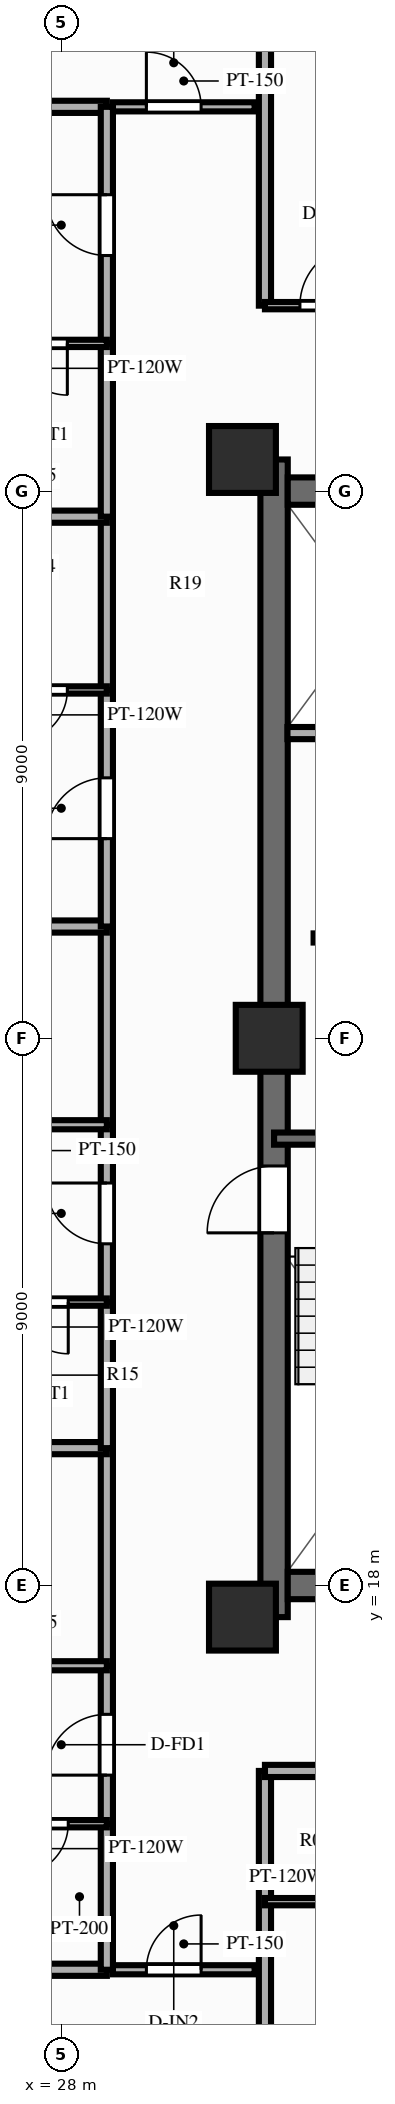
"""IFC4 building model, lengths in metres.
Left out: names, types, materials, properties, quantities, classifications, styles, units other than length and angle.
Written with IfcOpenShell. Run it as: python <this file> out.ifc"""

import sys

from ifc_helpers import new_model, si_unit, direction, frame, frame_2d, origin, origin_2d, place, context, subcontext, project, spatial, rectangle, extrude, source, transform, mapped, element, fill, save


model = new_model("IFC4")
c1 = context("Model", 3, precision=1e-05, world=origin(), true_north=direction((0.0, 1.0)))
c2 = subcontext(c1, "Body", "Model", "MODEL_VIEW")
j1 = project(units=[si_unit("LENGTHUNIT", "METRE"), si_unit("PLANEANGLEUNIT", "RADIAN")], contexts=[c1])
p1 = place(None, origin())
s1 = spatial("IfcSite", under=j1, at=p1, CompositionType="ELEMENT")
p2 = place(p1, origin())
s2 = spatial("IfcBuilding", under=s1, at=p2, CompositionType="ELEMENT")
p3 = place(p2, frame((0.0, 0.0, 199.6)))
s3 = spatial("IfcBuildingStorey", under=s2, at=p3, CompositionType="ELEMENT", Elevation=199.6)
p4 = place(p3, frame((31.5, 17.48, 0.0), z_axis=(0.0, 0.0, 1.0), x_axis=(0.0, 1.0, 0.0)))
e1 = element("IfcWall", 1, at=p4, inside=s3, PredefinedType="SHEAR", context=c2, shape_type="SweptSolid", body=[
    extrude(rectangle(XDim=19.04, YDim=0.45, at=frame_2d((9.52, 0.0))), origin(), (0.0, 0.0, 1.0), 3.0),
])
p5 = place(p4, frame((6.32, 0.0, 0.0)))
e2 = element("IfcOpeningElement", 2, at=p5, cuts=e1, PredefinedType="OPENING", context=c2, shape_type="SweptSolid", body=[
    extrude(rectangle(XDim=1.1, YDim=2.15, at=frame_2d((0.55, 1.075))), frame((0.0, 0.237, 0.0), z_axis=(0.0, -1.0, 0.0), x_axis=(1.0, 0.0, 0.0)), (0.0, 0.0, 1.0), 0.474),
])
p6 = place(p3, frame((31.725, 18.0, 0.0), z_axis=(0.0, 0.0, 1.0), x_axis=(1.0, 0.0, 0.0)))
e3 = element("IfcWall", 3, at=p6, inside=s3, PredefinedType="SHEAR", context=c2, shape_type="SweptSolid", body=[
    extrude(rectangle(XDim=12.55, YDim=0.45, at=frame_2d((6.275, 0.0))), origin(), (0.0, 0.0, 1.0), 3.0),
])
p7 = place(p3, frame((31.725, 36.0, 0.0), z_axis=(0.0, 0.0, 1.0), x_axis=(1.0, 0.0, 0.0)))
e4 = element("IfcWall", 4, at=p7, inside=s3, PredefinedType="SHEAR", context=c2, shape_type="SweptSolid", body=[
    extrude(rectangle(XDim=12.55, YDim=0.45, at=frame_2d((6.275, 0.0))), origin(), (0.0, 0.0, 1.0), 3.0),
])
p8 = place(p7, frame((5.225, 0.0, 0.0), z_axis=(0.0, 0.0, 1.0), x_axis=(-1.0, 0.0, 0.0)))
e5 = element("IfcOpeningElement", 5, at=p8, cuts=e4, PredefinedType="OPENING", context=c2, shape_type="SweptSolid", body=[
    extrude(rectangle(XDim=1.4, YDim=2.15, at=frame_2d((0.7, 1.075))), frame((0.0, 0.237, 0.0), z_axis=(0.0, -1.0, 0.0), x_axis=(1.0, 0.0, 0.0)), (0.0, 0.0, 1.0), 0.474),
])
m1 = source(origin(), c2, "Body", "SweptSolid", [
    extrude(rectangle(XDim=1.1, YDim=1.1, at=origin_2d()), origin(), (0.0, 0.0, 1.0), 3.0),
])
for number, where, z_axis, x_axis in (
    (6, (30.98, 17.48, 0.0), (0.0, 0.0, 1.0), (1.0, 0.0, 0.0)),
    (7, (30.98, 36.52, 0.0), (0.0, 0.0, 1.0), (1.0, 0.0, 0.0)),
    (8, (31.42, 27.0, 0.0), (0.0, 0.0, 1.0), (1.0, 0.0, 0.0)),
):
    element("IfcColumn", number, at=place(p3, frame(where, z_axis=z_axis, x_axis=x_axis)), inside=s3, PredefinedType="COLUMN", context=c2, shape_type="MappedRepresentation", body=[
        mapped(m1, transform((0.0, 0.0, 0.0), scale=1.0)),
    ])
p9 = place(p3, frame((32.15, 28.65, 0.0), z_axis=(0.0, 0.0, 1.0), x_axis=(1.0, 0.0, 0.0)))
e9 = element("IfcWall", 9, at=p9, inside=s3, PredefinedType="PARTITIONING", context=c2, shape_type="SweptSolid", body=[
    extrude(rectangle(XDim=2.27, YDim=0.15, at=frame_2d((1.135, 0.0))), origin(), (0.0, 0.0, 1.0), 2.14),
])
p10 = place(p3, frame((31.5, 25.35, 0.0), z_axis=(0.0, 0.0, 1.0), x_axis=(1.0, 0.0, 0.0)))
e10 = element("IfcWall", 10, at=p10, inside=s3, PredefinedType="SOLIDWALL", context=c2, shape_type="SweptSolid", body=[
    extrude(rectangle(XDim=3.93, YDim=0.2, at=frame_2d((1.965, 0.0))), origin(), (0.0, 0.0, 1.0), 2.79),
])
p11 = place(p3, frame((31.72, 32.02, 0.0), z_axis=(0.0, 0.0, 1.0), x_axis=(1.0, 0.0, 0.0)))
e11 = element("IfcWall", 11, at=p11, inside=s3, PredefinedType="PARTITIONING", context=c2, shape_type="SweptSolid", body=[
    extrude(rectangle(XDim=2.8, YDim=0.2, at=frame_2d((1.4, 0.0))), origin(), (0.0, 0.0, 1.0), 2.79),
])
p12 = place(p3, frame((28.85, 11.68, 0.0), z_axis=(0.0, 0.0, 1.0), x_axis=(1.0, 0.0, 0.0)))
e12 = element("IfcWall", 12, at=p12, inside=s3, PredefinedType="PARTITIONING", context=c2, shape_type="SweptSolid", body=[
    extrude(rectangle(XDim=2.33, YDim=0.15, at=frame_2d((1.165, 0.0))), origin(), (0.0, 0.0, 1.0), 2.79),
])
p13 = place(p12, frame((0.55, 0.0, 0.0)))
e13 = element("IfcOpeningElement", 13, at=p13, cuts=e12, PredefinedType="OPENING", context=c2, shape_type="SweptSolid", body=[
    extrude(rectangle(XDim=0.9, YDim=2.1, at=frame_2d((0.45, 1.05))), frame((0.0, 0.087, 0.0), z_axis=(0.0, -1.0, 0.0), x_axis=(1.0, 0.0, 0.0)), (0.0, 0.0, 1.0), 0.174),
])
p14 = place(p3, frame((28.85, 42.32, 0.0), z_axis=(0.0, 0.0, 1.0), x_axis=(1.0, 0.0, 0.0)))
e14 = element("IfcWall", 14, at=p14, inside=s3, PredefinedType="PARTITIONING", context=c2, shape_type="SweptSolid", body=[
    extrude(rectangle(XDim=2.33, YDim=0.15, at=frame_2d((1.165, 0.0))), origin(), (0.0, 0.0, 1.0), 2.79),
])
p15 = place(p14, frame((0.55, 0.0, 0.0)))
e15 = element("IfcOpeningElement", 15, at=p15, cuts=e14, PredefinedType="OPENING", context=c2, shape_type="SweptSolid", body=[
    extrude(rectangle(XDim=0.9, YDim=2.1, at=frame_2d((0.45, 1.05))), frame((0.0, 0.087, 0.0), z_axis=(0.0, -1.0, 0.0), x_axis=(1.0, 0.0, 0.0)), (0.0, 0.0, 1.0), 0.174),
])
p16 = place(p3, frame((31.35, 14.95, 0.0), z_axis=(0.0, 0.0, 1.0), x_axis=(0.0, -1.0, 0.0)))
e16 = element("IfcWall", 16, at=p16, inside=s3, PredefinedType="PARTITIONING", context=c2, shape_type="SweptSolid", body=[
    extrude(rectangle(XDim=8.8, YDim=0.2, at=frame_2d((4.4, 0.0))), origin(), (0.0, 0.0, 1.0), 2.39),
])
p17 = place(p3, frame((31.35, 14.95, 0.0), z_axis=(0.0, 0.0, 1.0), x_axis=(1.0, 0.0, 0.0)))
e17 = element("IfcWall", 17, at=p17, inside=s3, PredefinedType="PARTITIONING", context=c2, shape_type="SweptSolid", body=[
    extrude(rectangle(XDim=2.85, YDim=0.2, at=frame_2d((1.425, 0.0))), origin(), (0.0, 0.0, 1.0), 2.79),
])
p18 = place(p3, frame((31.35, 12.8, 0.0), z_axis=(0.0, 0.0, 1.0), x_axis=(1.0, 0.0, 0.0)))
e18 = element("IfcWall", 18, at=p18, inside=s3, PredefinedType="PARTITIONING", context=c2, shape_type="SweptSolid", body=[
    extrude(rectangle(XDim=2.85, YDim=0.12, at=frame_2d((1.425, 0.0))), origin(), (0.0, 0.0, 1.0), 2.79),
])
p19 = place(p3, frame((31.35, 39.05, 0.0), z_axis=(0.0, 0.0, 1.0), x_axis=(0.0, 1.0, 0.0)))
e19 = element("IfcWall", 19, at=p19, inside=s3, PredefinedType="PARTITIONING", context=c2, shape_type="SweptSolid", body=[
    extrude(rectangle(XDim=8.8, YDim=0.2, at=frame_2d((4.4, 0.0))), origin(), (0.0, 0.0, 1.0), 2.39),
])
p20 = place(p3, frame((31.35, 39.05, 0.0), z_axis=(0.0, 0.0, 1.0), x_axis=(1.0, 0.0, 0.0)))
e20 = element("IfcWall", 20, at=p20, inside=s3, PredefinedType="PARTITIONING", context=c2, shape_type="SweptSolid", body=[
    extrude(rectangle(XDim=2.15, YDim=0.12, at=frame_2d((1.075, 0.0))), origin(), (0.0, 0.0, 1.0), 2.79),
])
p21 = place(p20, frame((0.575, 0.0, 0.0)))
e21 = element("IfcOpeningElement", 21, at=p21, cuts=e20, PredefinedType="OPENING", context=c2, shape_type="SweptSolid", body=[
    extrude(rectangle(XDim=1.0, YDim=2.1, at=frame_2d((0.5, 1.05))), frame((0.0, 0.072, 0.0), z_axis=(0.0, -1.0, 0.0), x_axis=(1.0, 0.0, 0.0)), (0.0, 0.0, 1.0), 0.144),
])
for number, where, z_axis, x_axis in (
    (22, (28.75, 11.68, 0.0), (0.0, 0.0, 1.0), (-1.0, 0.0, 0.0)),
    (23, (28.75, 42.32, 0.0), (0.0, 0.0, 1.0), (-1.0, 0.0, 0.0)),
):
    element("IfcWall", number, at=place(p3, frame(where, z_axis=z_axis, x_axis=x_axis)), inside=s3, PredefinedType="PARTITIONING", context=c2, shape_type="SweptSolid", body=[
        extrude(rectangle(XDim=9.1, YDim=0.2, at=frame_2d((4.55, 0.0))), origin(), (0.0, 0.0, 1.0), 2.79),
    ])
p22 = place(p3, frame((28.75, 11.68, 0.0), z_axis=(0.0, 0.0, 1.0), x_axis=(0.0, 1.0, 0.0)))
e24 = element("IfcWall", 24, at=p22, inside=s3, PredefinedType="PARTITIONING", context=c2, shape_type="SweptSolid", body=[
    extrude(rectangle(XDim=2.402, YDim=0.2, at=frame_2d((1.201, 0.0))), origin(), (0.0, 0.0, 1.0), 2.79),
])
p23 = place(p3, frame((28.75, 14.082, 0.0), z_axis=(0.0, 0.0, 1.0), x_axis=(0.0, 1.0, 0.0)))
e25 = element("IfcWall", 25, at=p23, inside=s3, PredefinedType="PARTITIONING", context=c2, shape_type="SweptSolid", body=[
    extrude(rectangle(XDim=2.598, YDim=0.2, at=frame_2d((1.299, 0.0))), origin(), (0.0, 0.0, 1.0), 2.79),
])
p24 = place(p23, frame((0.799, 0.0, 0.0)))
e26 = element("IfcOpeningElement", 26, at=p24, cuts=e25, PredefinedType="OPENING", context=c2, shape_type="SweptSolid", body=[
    extrude(rectangle(XDim=1.0, YDim=2.15, at=frame_2d((0.5, 1.075))), frame((0.0, 0.112, 0.0), z_axis=(0.0, -1.0, 0.0), x_axis=(1.0, 0.0, 0.0)), (0.0, 0.0, 1.0), 0.224),
])
p25 = place(p3, frame((28.75, 16.68, 0.0), z_axis=(0.0, 0.0, 1.0), x_axis=(0.0, 1.0, 0.0)))
e27 = element("IfcWall", 27, at=p25, inside=s3, PredefinedType="PARTITIONING", context=c2, shape_type="SweptSolid", body=[
    extrude(rectangle(XDim=3.579, YDim=0.2, at=frame_2d((1.79, 0.0))), origin(), (0.0, 0.0, 1.0), 2.79),
])
p26 = place(p3, frame((28.75, 14.082, 0.0), z_axis=(0.0, 0.0, 1.0), x_axis=(-1.0, 0.0, 0.0)))
e28 = element("IfcWall", 28, at=p26, inside=s3, PredefinedType="PARTITIONING", context=c2, shape_type="SweptSolid", body=[
    extrude(rectangle(XDim=2.12, YDim=0.12, at=frame_2d((1.06, 0.0))), origin(), (0.0, 0.0, 1.0), 2.79),
])
p27 = place(p26, frame((0.635, 0.0, 0.0)))
e29 = element("IfcOpeningElement", 29, at=p27, cuts=e28, PredefinedType="OPENING", context=c2, shape_type="SweptSolid", body=[
    extrude(rectangle(XDim=0.85, YDim=2.05, at=frame_2d((0.425, 1.025))), frame((0.0, 0.072, 0.0), z_axis=(0.0, -1.0, 0.0), x_axis=(1.0, 0.0, 0.0)), (0.0, 0.0, 1.0), 0.144),
])
p28 = place(p3, frame((28.75, 16.68, 0.0), z_axis=(0.0, 0.0, 1.0), x_axis=(-1.0, 0.0, 0.0)))
e30 = element("IfcWall", 30, at=p28, inside=s3, PredefinedType="PARTITIONING", context=c2, shape_type="SweptSolid", body=[
    extrude(rectangle(XDim=3.08, YDim=0.15, at=frame_2d((1.54, 0.0))), origin(), (0.0, 0.0, 1.0), 2.79),
])
p29 = place(p28, frame((1.09, 0.0, 0.0)))
e31 = element("IfcOpeningElement", 31, at=p29, cuts=e30, PredefinedType="OPENING", context=c2, shape_type="SweptSolid", body=[
    extrude(rectangle(XDim=0.9, YDim=2.1, at=frame_2d((0.45, 1.05))), frame((0.0, 0.087, 0.0), z_axis=(0.0, -1.0, 0.0), x_axis=(1.0, 0.0, 0.0)), (0.0, 0.0, 1.0), 0.174),
])
p30 = place(p3, frame((28.75, 20.259, 0.0), z_axis=(0.0, 0.0, 1.0), x_axis=(-1.0, 0.0, 0.0)))
e32 = element("IfcWall", 32, at=p30, inside=s3, PredefinedType="PARTITIONING", context=c2, shape_type="SweptSolid", body=[
    extrude(rectangle(XDim=9.1, YDim=0.2, at=frame_2d((4.55, 0.0))), origin(), (0.0, 0.0, 1.0), 2.79),
])
p31 = place(p3, frame((28.75, 20.259, 0.0), z_axis=(0.0, 0.0, 1.0), x_axis=(0.0, 1.0, 0.0)))
e33 = element("IfcWall", 33, at=p31, inside=s3, PredefinedType="PARTITIONING", context=c2, shape_type="SweptSolid", body=[
    extrude(rectangle(XDim=2.402, YDim=0.2, at=frame_2d((1.201, 0.0))), origin(), (0.0, 0.0, 1.0), 2.79),
])
p32 = place(p3, frame((28.75, 22.661, 0.0), z_axis=(0.0, 0.0, 1.0), x_axis=(0.0, 1.0, 0.0)))
e34 = element("IfcWall", 34, at=p32, inside=s3, PredefinedType="PARTITIONING", context=c2, shape_type="SweptSolid", body=[
    extrude(rectangle(XDim=2.917, YDim=0.2, at=frame_2d((1.458, 0.0))), origin(), (0.0, 0.0, 1.0), 2.79),
])
p33 = place(p32, frame((0.958, 0.0, 0.0)))
e35 = element("IfcOpeningElement", 35, at=p33, cuts=e34, PredefinedType="OPENING", context=c2, shape_type="SweptSolid", body=[
    extrude(rectangle(XDim=1.0, YDim=2.15, at=frame_2d((0.5, 1.075))), frame((0.0, 0.112, 0.0), z_axis=(0.0, -1.0, 0.0), x_axis=(1.0, 0.0, 0.0)), (0.0, 0.0, 1.0), 0.224),
])
p34 = place(p3, frame((28.75, 25.578, 0.0), z_axis=(0.0, 0.0, 1.0), x_axis=(0.0, 1.0, 0.0)))
e36 = element("IfcWall", 36, at=p34, inside=s3, PredefinedType="PARTITIONING", context=c2, shape_type="SweptSolid", body=[
    extrude(rectangle(XDim=3.26, YDim=0.2, at=frame_2d((1.63, 0.0))), origin(), (0.0, 0.0, 1.0), 2.79),
])
p35 = place(p3, frame((28.75, 22.661, 0.0), z_axis=(0.0, 0.0, 1.0), x_axis=(-1.0, 0.0, 0.0)))
e37 = element("IfcWall", 37, at=p35, inside=s3, PredefinedType="PARTITIONING", context=c2, shape_type="SweptSolid", body=[
    extrude(rectangle(XDim=2.12, YDim=0.12, at=frame_2d((1.06, 0.0))), origin(), (0.0, 0.0, 1.0), 2.79),
])
p36 = place(p35, frame((0.635, 0.0, 0.0)))
e38 = element("IfcOpeningElement", 38, at=p36, cuts=e37, PredefinedType="OPENING", context=c2, shape_type="SweptSolid", body=[
    extrude(rectangle(XDim=0.85, YDim=2.05, at=frame_2d((0.425, 1.025))), frame((0.0, 0.072, 0.0), z_axis=(0.0, -1.0, 0.0), x_axis=(1.0, 0.0, 0.0)), (0.0, 0.0, 1.0), 0.144),
])
p37 = place(p3, frame((28.75, 25.578, 0.0), z_axis=(0.0, 0.0, 1.0), x_axis=(-1.0, 0.0, 0.0)))
e39 = element("IfcWall", 39, at=p37, inside=s3, PredefinedType="PARTITIONING", context=c2, shape_type="SweptSolid", body=[
    extrude(rectangle(XDim=3.08, YDim=0.15, at=frame_2d((1.54, 0.0))), origin(), (0.0, 0.0, 1.0), 2.79),
])
p38 = place(p37, frame((1.09, 0.0, 0.0)))
e40 = element("IfcOpeningElement", 40, at=p38, cuts=e39, PredefinedType="OPENING", context=c2, shape_type="SweptSolid", body=[
    extrude(rectangle(XDim=0.9, YDim=2.1, at=frame_2d((0.45, 1.05))), frame((0.0, 0.087, 0.0), z_axis=(0.0, -1.0, 0.0), x_axis=(1.0, 0.0, 0.0)), (0.0, 0.0, 1.0), 0.174),
])
p39 = place(p3, frame((28.75, 28.838, 0.0), z_axis=(0.0, 0.0, 1.0), x_axis=(-1.0, 0.0, 0.0)))
e41 = element("IfcWall", 41, at=p39, inside=s3, PredefinedType="PARTITIONING", context=c2, shape_type="SweptSolid", body=[
    extrude(rectangle(XDim=9.1, YDim=0.2, at=frame_2d((4.55, 0.0))), origin(), (0.0, 0.0, 1.0), 2.79),
])
p40 = place(p3, frame((28.75, 28.838, 0.0), z_axis=(0.0, 0.0, 1.0), x_axis=(0.0, 1.0, 0.0)))
e42 = element("IfcWall", 42, at=p40, inside=s3, PredefinedType="PARTITIONING", context=c2, shape_type="SweptSolid", body=[
    extrude(rectangle(XDim=3.891, YDim=0.2, at=frame_2d((1.945, 0.0))), origin(), (0.0, 0.0, 1.0), 2.79),
])
p41 = place(p40, frame((1.445, 0.0, 0.0)))
e43 = element("IfcOpeningElement", 43, at=p41, cuts=e42, PredefinedType="OPENING", context=c2, shape_type="SweptSolid", body=[
    extrude(rectangle(XDim=1.0, YDim=2.15, at=frame_2d((0.5, 1.075))), frame((0.0, 0.112, 0.0), z_axis=(0.0, -1.0, 0.0), x_axis=(1.0, 0.0, 0.0)), (0.0, 0.0, 1.0), 0.224),
])
p42 = place(p3, frame((28.75, 32.729, 0.0), z_axis=(0.0, 0.0, 1.0), x_axis=(0.0, 1.0, 0.0)))
e44 = element("IfcWall", 44, at=p42, inside=s3, PredefinedType="PARTITIONING", context=c2, shape_type="SweptSolid", body=[
    extrude(rectangle(XDim=2.85, YDim=0.2, at=frame_2d((1.425, 0.0))), origin(), (0.0, 0.0, 1.0), 2.79),
])
p43 = place(p3, frame((28.75, 32.729, 0.0), z_axis=(0.0, 0.0, 1.0), x_axis=(-1.0, 0.0, 0.0)))
e45 = element("IfcWall", 45, at=p43, inside=s3, PredefinedType="PARTITIONING", context=c2, shape_type="SweptSolid", body=[
    extrude(rectangle(XDim=2.15, YDim=0.12, at=frame_2d((1.075, 0.0))), origin(), (0.0, 0.0, 1.0), 2.79),
])
p44 = place(p43, frame((0.65, 0.0, 0.0)))
e46 = element("IfcOpeningElement", 46, at=p44, cuts=e45, PredefinedType="OPENING", context=c2, shape_type="SweptSolid", body=[
    extrude(rectangle(XDim=0.85, YDim=2.05, at=frame_2d((0.425, 1.025))), frame((0.0, 0.072, 0.0), z_axis=(0.0, -1.0, 0.0), x_axis=(1.0, 0.0, 0.0)), (0.0, 0.0, 1.0), 0.144),
])
p45 = place(p3, frame((28.75, 35.579, 0.0), z_axis=(0.0, 0.0, 1.0), x_axis=(-1.0, 0.0, 0.0)))
e47 = element("IfcWall", 47, at=p45, inside=s3, PredefinedType="PARTITIONING", context=c2, shape_type="SweptSolid", body=[
    extrude(rectangle(XDim=9.1, YDim=0.2, at=frame_2d((4.55, 0.0))), origin(), (0.0, 0.0, 1.0), 2.79),
])
p46 = place(p3, frame((28.75, 35.579, 0.0), z_axis=(0.0, 0.0, 1.0), x_axis=(0.0, 1.0, 0.0)))
e48 = element("IfcWall", 48, at=p46, inside=s3, PredefinedType="PARTITIONING", context=c2, shape_type="SweptSolid", body=[
    extrude(rectangle(XDim=2.85, YDim=0.2, at=frame_2d((1.425, 0.0))), origin(), (0.0, 0.0, 1.0), 2.79),
])
p47 = place(p3, frame((28.75, 38.429, 0.0), z_axis=(0.0, 0.0, 1.0), x_axis=(0.0, 1.0, 0.0)))
e49 = element("IfcWall", 49, at=p47, inside=s3, PredefinedType="PARTITIONING", context=c2, shape_type="SweptSolid", body=[
    extrude(rectangle(XDim=3.891, YDim=0.2, at=frame_2d((1.945, 0.0))), origin(), (0.0, 0.0, 1.0), 2.79),
])
p48 = place(p47, frame((1.445, 0.0, 0.0)))
e50 = element("IfcOpeningElement", 50, at=p48, cuts=e49, PredefinedType="OPENING", context=c2, shape_type="SweptSolid", body=[
    extrude(rectangle(XDim=1.0, YDim=2.15, at=frame_2d((0.5, 1.075))), frame((0.0, 0.112, 0.0), z_axis=(0.0, -1.0, 0.0), x_axis=(1.0, 0.0, 0.0)), (0.0, 0.0, 1.0), 0.224),
])
p49 = place(p3, frame((28.75, 38.429, 0.0), z_axis=(0.0, 0.0, 1.0), x_axis=(-1.0, 0.0, 0.0)))
e51 = element("IfcWall", 51, at=p49, inside=s3, PredefinedType="PARTITIONING", context=c2, shape_type="SweptSolid", body=[
    extrude(rectangle(XDim=2.15, YDim=0.12, at=frame_2d((1.075, 0.0))), origin(), (0.0, 0.0, 1.0), 2.79),
])
p50 = place(p49, frame((0.65, 0.0, 0.0)))
e52 = element("IfcOpeningElement", 52, at=p50, cuts=e51, PredefinedType="OPENING", context=c2, shape_type="SweptSolid", body=[
    extrude(rectangle(XDim=0.85, YDim=2.05, at=frame_2d((0.425, 1.025))), frame((0.0, 0.072, 0.0), z_axis=(0.0, -1.0, 0.0), x_axis=(1.0, 0.0, 0.0)), (0.0, 0.0, 1.0), 0.144),
])
m2 = source(origin(), c2, "Body", "SweptSolid", [
    extrude(rectangle(XDim=1.1, YDim=2.15, at=frame_2d((0.55, 1.075))), frame((0.0, 0.025, 0.0), z_axis=(0.0, -1.0, 0.0), x_axis=(1.0, 0.0, 0.0)), (0.0, 0.0, 1.0), 0.05),
])
p51 = place(p5, origin())
e53 = element("IfcDoor", 53, at=p51, inside=s3, OperationType="SINGLE_SWING_LEFT", PredefinedType="DOOR", context=c2, shape_type="MappedRepresentation", body=[
    mapped(m2, transform((0.0, 0.0, 0.0), scale=1.0)),
])
fill(e2, e53)
m3 = source(origin(), c2, "Body", "SweptSolid", [
    extrude(rectangle(XDim=0.9, YDim=2.1, at=frame_2d((0.45, 1.05))), frame((0.0, 0.025, 0.0), z_axis=(0.0, -1.0, 0.0), x_axis=(1.0, 0.0, 0.0)), (0.0, 0.0, 1.0), 0.05),
])
p52 = place(p13, origin())
e54 = element("IfcDoor", 54, at=p52, inside=s3, OperationType="SINGLE_SWING_RIGHT", PredefinedType="DOOR", context=c2, shape_type="MappedRepresentation", body=[
    mapped(m3, transform((0.0, 0.0, 0.0), scale=1.0)),
])
fill(e13, e54)
p53 = place(p15, origin())
e55 = element("IfcDoor", 55, at=p53, inside=s3, OperationType="SINGLE_SWING_LEFT", PredefinedType="DOOR", context=c2, shape_type="MappedRepresentation", body=[
    mapped(m3, transform((0.0, 0.0, 0.0), scale=1.0)),
])
fill(e15, e55)
m4 = source(origin(), c2, "Body", "SweptSolid", [
    extrude(rectangle(XDim=1.0, YDim=2.1, at=frame_2d((0.5, 1.05))), frame((0.0, 0.025, 0.0), z_axis=(0.0, -1.0, 0.0), x_axis=(1.0, 0.0, 0.0)), (0.0, 0.0, 1.0), 0.05),
])
p54 = place(p21, origin())
e56 = element("IfcDoor", 56, at=p54, inside=s3, OperationType="SINGLE_SWING_RIGHT", PredefinedType="DOOR", context=c2, shape_type="MappedRepresentation", body=[
    mapped(m4, transform((0.0, 0.0, 0.0), scale=1.0)),
])
fill(e21, e56)
m5 = source(origin(), c2, "Body", "SweptSolid", [
    extrude(rectangle(XDim=1.0, YDim=2.15, at=frame_2d((0.5, 1.075))), frame((0.0, 0.025, 0.0), z_axis=(0.0, -1.0, 0.0), x_axis=(1.0, 0.0, 0.0)), (0.0, 0.0, 1.0), 0.05),
])
p55 = place(p24, origin())
e57 = element("IfcDoor", 57, at=p55, inside=s3, OperationType="SINGLE_SWING_LEFT", PredefinedType="DOOR", context=c2, shape_type="MappedRepresentation", body=[
    mapped(m5, transform((0.0, 0.0, 0.0), scale=1.0)),
])
fill(e26, e57)
m6 = source(origin(), c2, "Body", "SweptSolid", [
    extrude(rectangle(XDim=0.85, YDim=2.05, at=frame_2d((0.425, 1.025))), frame((0.0, 0.025, 0.0), z_axis=(0.0, -1.0, 0.0), x_axis=(1.0, 0.0, 0.0)), (0.0, 0.0, 1.0), 0.05),
])
p56 = place(p27, origin())
e58 = element("IfcDoor", 58, at=p56, inside=s3, OperationType="SINGLE_SWING_RIGHT", PredefinedType="DOOR", context=c2, shape_type="MappedRepresentation", body=[
    mapped(m6, transform((0.0, 0.0, 0.0), scale=1.0)),
])
fill(e29, e58)
p57 = place(p33, origin())
e59 = element("IfcDoor", 59, at=p57, inside=s3, OperationType="SINGLE_SWING_RIGHT", PredefinedType="DOOR", context=c2, shape_type="MappedRepresentation", body=[
    mapped(m5, transform((0.0, 0.0, 0.0), scale=1.0)),
])
fill(e35, e59)
p58 = place(p36, origin())
e60 = element("IfcDoor", 60, at=p58, inside=s3, OperationType="SINGLE_SWING_LEFT", PredefinedType="DOOR", context=c2, shape_type="MappedRepresentation", body=[
    mapped(m6, transform((0.0, 0.0, 0.0), scale=1.0)),
])
fill(e38, e60)
p59 = place(p41, origin())
e61 = element("IfcDoor", 61, at=p59, inside=s3, OperationType="SINGLE_SWING_LEFT", PredefinedType="DOOR", context=c2, shape_type="MappedRepresentation", body=[
    mapped(m5, transform((0.0, 0.0, 0.0), scale=1.0)),
])
fill(e43, e61)
p60 = place(p44, origin())
e62 = element("IfcDoor", 62, at=p60, inside=s3, OperationType="SINGLE_SWING_RIGHT", PredefinedType="DOOR", context=c2, shape_type="MappedRepresentation", body=[
    mapped(m6, transform((0.0, 0.0, 0.0), scale=1.0)),
])
fill(e46, e62)
p61 = place(p48, origin())
e63 = element("IfcDoor", 63, at=p61, inside=s3, OperationType="SINGLE_SWING_RIGHT", PredefinedType="DOOR", context=c2, shape_type="MappedRepresentation", body=[
    mapped(m5, transform((0.0, 0.0, 0.0), scale=1.0)),
])
fill(e50, e63)
p62 = place(p50, origin())
e64 = element("IfcDoor", 64, at=p62, inside=s3, OperationType="SINGLE_SWING_LEFT", PredefinedType="DOOR", context=c2, shape_type="MappedRepresentation", body=[
    mapped(m6, transform((0.0, 0.0, 0.0), scale=1.0)),
])
fill(e52, e64)
save(model, sys.argv[1])
